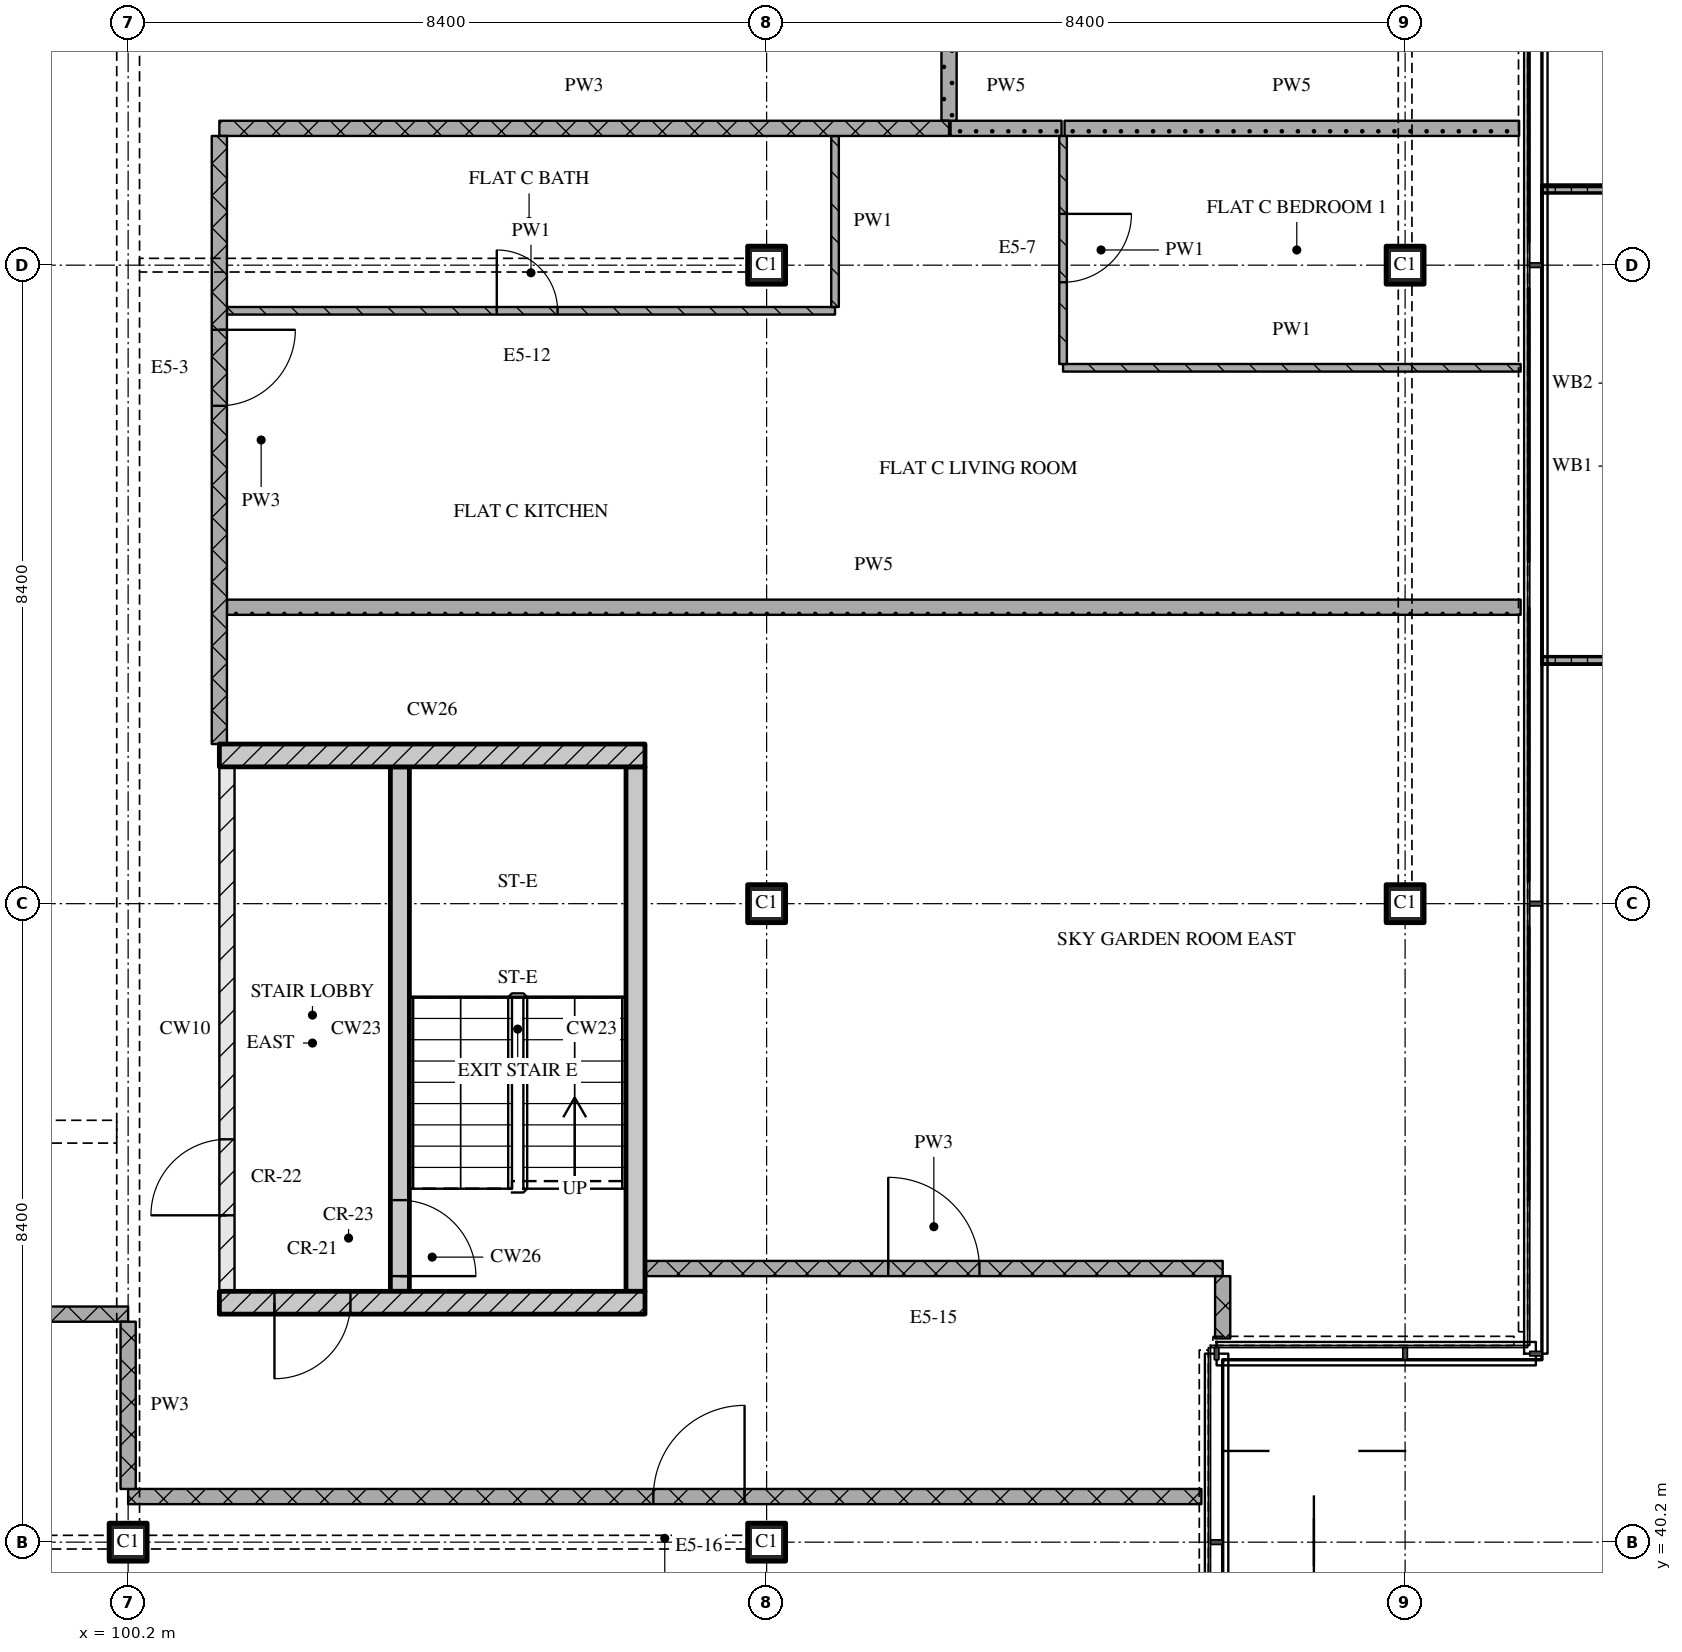
"""IFC4 building model, lengths in metres.
Left out: names, types, materials, properties, quantities, classifications, styles, units other than length and angle.
Written with IfcOpenShell. Run it as: python <this file> out.ifc"""

import sys

from ifc_helpers import new_model, si_unit, direction, frame, frame_2d, origin, origin_2d, place, context, subcontext, project, spatial, polyline, rectangle, outline, extrude, element, fill, save


model = new_model("IFC4")
c1 = context("Model", 3, precision=1e-05, world=origin(), true_north=direction((0.0, 1.0)))
c2 = subcontext(c1, "Body", "Model", "MODEL_VIEW")
j1 = project(units=[si_unit("LENGTHUNIT", "METRE"), si_unit("PLANEANGLEUNIT", "RADIAN")], contexts=[c1])
p1 = place(None, origin())
s1 = spatial("IfcSite", under=j1, at=p1, CompositionType="ELEMENT")
p2 = place(p1, origin())
s2 = spatial("IfcBuilding", under=s1, at=p2, CompositionType="ELEMENT")
p3 = place(p2, frame((0.0, 0.0, 288.75)))
s3 = spatial("IfcBuildingStorey", under=s2, at=p3, CompositionType="ELEMENT", Elevation=288.75)
for number, where, z_axis, x_axis in (
    (1, (100.2, 40.2, 0.0), (0.0, 0.0, 1.0), (1.0, 0.0, 0.0)),
    (2, (108.6, 40.2, 0.0), (0.0, 0.0, 1.0), (1.0, 0.0, 0.0)),
    (3, (108.6, 48.6, 0.0), (0.0, 0.0, 1.0), (1.0, 0.0, 0.0)),
    (4, (108.6, 57.0, 0.0), (0.0, 0.0, 1.0), (1.0, 0.0, 0.0)),
    (5, (117.0, 48.6, 0.0), (0.0, 0.0, 1.0), (1.0, 0.0, 0.0)),
    (6, (117.0, 57.0, 0.0), (0.0, 0.0, 1.0), (1.0, 0.0, 0.0)),
):
    element("IfcColumn", number, at=place(p3, frame(where, z_axis=z_axis, x_axis=x_axis)), inside=s3, PredefinedType="COLUMN", context=c2, shape_type="SweptSolid", body=[
        extrude(rectangle(XDim=0.5, YDim=0.5, at=origin_2d()), origin(), (0.0, 0.0, 1.0), 3.6),
    ])
p4 = place(p3, origin())
e7 = element("IfcWall", 7, at=p4, inside=s3, PredefinedType="SOLIDWALL", context=c2, shape_type="SweptSolid", body=[
    extrude(outline(polyline([(118.8, 51.75), (118.8, 51.85), (120.567, 51.85), (120.567, 57.95), (118.8, 57.95), (118.8, 58.05), (120.667, 58.05), (120.667, 51.75), (118.8, 51.75)])), origin(), (0.0, 0.0, 1.0), 1.0),
])
p5 = place(p3, frame((101.4, 43.35, 0.0), z_axis=(0.0, 0.0, 1.0), x_axis=(1.0, 0.0, 0.0)))
e8 = element("IfcWall", 8, at=p5, inside=s3, PredefinedType="SOLIDWALL", context=c2, shape_type="SweptSolid", body=[
    extrude(rectangle(XDim=5.6, YDim=0.3, at=frame_2d((2.8, 0.0))), origin(), (0.0, 0.0, 1.0), 3.32),
])
p6 = place(p5, frame((0.725, 0.0, 0.0)))
e9 = element("IfcOpeningElement", 9, at=p6, cuts=e8, PredefinedType="OPENING", context=c2, shape_type="SweptSolid", body=[
    extrude(rectangle(XDim=1.0, YDim=2.1, at=frame_2d((0.5, 1.05))), frame((0.0, 0.16, 0.0), z_axis=(0.0, -1.0, 0.0), x_axis=(1.0, 0.0, 0.0)), (0.0, 0.0, 1.0), 0.32),
])
p7 = place(p3, frame((101.5, 43.5, 0.0), z_axis=(0.0, 0.0, 1.0), x_axis=(0.0, 1.0, 0.0)))
e10 = element("IfcWall", 10, at=p7, inside=s3, PredefinedType="PARTITIONING", context=c2, shape_type="SweptSolid", body=[
    extrude(rectangle(XDim=6.9, YDim=0.2, at=frame_2d((3.45, 0.0))), origin(), (0.0, 0.0, 1.0), 3.32),
])
p8 = place(p7, frame((1.0, 0.0, 0.0)))
e11 = element("IfcOpeningElement", 11, at=p8, cuts=e10, PredefinedType="OPENING", context=c2, shape_type="SweptSolid", body=[
    extrude(rectangle(XDim=1.0, YDim=2.1, at=frame_2d((0.5, 1.05))), frame((0.0, 0.11, 0.0), z_axis=(0.0, -1.0, 0.0), x_axis=(1.0, 0.0, 0.0)), (0.0, 0.0, 1.0), 0.22),
])
p9 = place(p3, frame((103.775, 43.5, 0.0), z_axis=(0.0, 0.0, 1.0), x_axis=(0.0, 1.0, 0.0)))
e12 = element("IfcWall", 12, at=p9, inside=s3, PredefinedType="SOLIDWALL", context=c2, shape_type="SweptSolid", body=[
    extrude(rectangle(XDim=6.9, YDim=0.25, at=frame_2d((3.45, 0.0))), origin(), (0.0, 0.0, 1.0), 3.32),
])
p10 = place(p9, frame((0.2, 0.0, 0.0)))
e13 = element("IfcOpeningElement", 13, at=p10, cuts=e12, PredefinedType="OPENING", context=c2, shape_type="SweptSolid", body=[
    extrude(rectangle(XDim=1.0, YDim=2.1, at=frame_2d((0.5, 1.05))), frame((0.0, 0.135, 0.0), z_axis=(0.0, -1.0, 0.0), x_axis=(1.0, 0.0, 0.0)), (0.0, 0.0, 1.0), 0.27),
])
p11 = place(p3, frame((106.875, 43.5, 0.0), z_axis=(0.0, 0.0, 1.0), x_axis=(0.0, 1.0, 0.0)))
e14 = element("IfcWall", 14, at=p11, inside=s3, PredefinedType="SOLIDWALL", context=c2, shape_type="SweptSolid", body=[
    extrude(rectangle(XDim=6.9, YDim=0.25, at=frame_2d((3.45, 0.0))), origin(), (0.0, 0.0, 1.0), 3.32),
])
p12 = place(p3, frame((101.4, 50.55, 0.0), z_axis=(0.0, 0.0, 1.0), x_axis=(1.0, 0.0, 0.0)))
e15 = element("IfcWall", 15, at=p12, inside=s3, PredefinedType="SOLIDWALL", context=c2, shape_type="SweptSolid", body=[
    extrude(rectangle(XDim=5.6, YDim=0.3, at=frame_2d((2.8, 0.0))), origin(), (0.0, 0.0, 1.0), 3.32),
])
p13 = place(p3, frame((114.32, 40.8, 0.0), z_axis=(0.0, 0.0, 1.0), x_axis=(-1.0, 0.0, 0.0)))
e16 = element("IfcWall", 16, at=p13, inside=s3, PredefinedType="PARTITIONING", context=c2, shape_type="SweptSolid", body=[
    extrude(rectangle(XDim=14.12, YDim=0.2, at=frame_2d((7.06, 0.0))), origin(), (0.0, 0.0, 1.0), 3.32),
])
p14 = place(p13, frame((6.01, 0.0, 0.0)))
e17 = element("IfcOpeningElement", 17, at=p14, cuts=e16, PredefinedType="OPENING", context=c2, shape_type="SweptSolid", body=[
    extrude(rectangle(XDim=1.2, YDim=2.1, at=frame_2d((0.6, 1.05))), frame((0.0, 0.11, 0.0), z_axis=(0.0, -1.0, 0.0), x_axis=(1.0, 0.0, 0.0)), (0.0, 0.0, 1.0), 0.22),
])
p15 = place(p3, frame((100.2, 43.2, 0.0), z_axis=(0.0, 0.0, 1.0), x_axis=(-1.0, 0.0, 0.0)))
e18 = element("IfcWall", 18, at=p15, inside=s3, PredefinedType="PARTITIONING", context=c2, shape_type="SweptSolid", body=[
    extrude(rectangle(XDim=25.2, YDim=0.2, at=frame_2d((12.6, 0.0))), origin(), (0.0, 0.0, 1.0), 3.32),
])
p16 = place(p15, frame((12.0, 0.0, 0.0)))
e19 = element("IfcOpeningElement", 19, at=p16, cuts=e18, PredefinedType="OPENING", context=c2, shape_type="SweptSolid", body=[
    extrude(rectangle(XDim=1.2, YDim=2.1, at=frame_2d((0.6, 1.05))), frame((0.0, 0.11, 0.0), z_axis=(0.0, -1.0, 0.0), x_axis=(1.0, 0.0, 0.0)), (0.0, 0.0, 1.0), 0.22),
])
p17 = place(p3, frame((107.0, 43.8, 0.0), z_axis=(0.0, 0.0, 1.0), x_axis=(1.0, 0.0, 0.0)))
e20 = element("IfcWall", 20, at=p17, inside=s3, PredefinedType="PARTITIONING", context=c2, shape_type="SweptSolid", body=[
    extrude(rectangle(XDim=7.6, YDim=0.2, at=frame_2d((3.8, 0.0))), origin(), (0.0, 0.0, 1.0), 3.32),
])
p18 = place(p17, frame((3.2, 0.0, 0.0)))
e21 = element("IfcOpeningElement", 21, at=p18, cuts=e20, PredefinedType="OPENING", context=c2, shape_type="SweptSolid", body=[
    extrude(rectangle(XDim=1.2, YDim=2.1, at=frame_2d((0.6, 1.05))), frame((0.0, 0.11, 0.0), z_axis=(0.0, -1.0, 0.0), x_axis=(1.0, 0.0, 0.0)), (0.0, 0.0, 1.0), 0.22),
])
p19 = place(p3, frame((101.5, 52.5, 0.0), z_axis=(0.0, 0.0, 1.0), x_axis=(1.0, 0.0, 0.0)))
e22 = element("IfcWall", 22, at=p19, inside=s3, PredefinedType="PARTITIONING", context=c2, shape_type="SweptSolid", body=[
    extrude(rectangle(XDim=17.02, YDim=0.2, at=frame_2d((8.51, 0.0))), origin(), (0.0, 0.0, 1.0), 3.32),
])
p20 = place(p3, frame((112.5, 55.65, 0.0), z_axis=(0.0, 0.0, 1.0), x_axis=(1.0, 0.0, 0.0)))
e23 = element("IfcWall", 23, at=p20, inside=s3, PredefinedType="PARTITIONING", context=c2, shape_type="SweptSolid", body=[
    extrude(rectangle(XDim=6.02, YDim=0.1, at=frame_2d((3.01, 0.0))), origin(), (0.0, 0.0, 1.0), 3.32),
])
p21 = place(p3, frame((101.5, 56.4, 0.0), z_axis=(0.0, 0.0, 1.0), x_axis=(1.0, 0.0, 0.0)))
e24 = element("IfcWall", 24, at=p21, inside=s3, PredefinedType="PARTITIONING", context=c2, shape_type="SweptSolid", body=[
    extrude(rectangle(XDim=8.0, YDim=0.1, at=frame_2d((4.0, 0.0))), origin(), (0.0, 0.0, 1.0), 3.32),
])
p22 = place(p21, frame((3.55, 0.0, 0.0)))
e25 = element("IfcOpeningElement", 25, at=p22, cuts=e24, PredefinedType="OPENING", context=c2, shape_type="SweptSolid", body=[
    extrude(rectangle(XDim=0.8, YDim=2.1, at=frame_2d((0.4, 1.05))), frame((0.0, 0.06, 0.0), z_axis=(0.0, -1.0, 0.0), x_axis=(1.0, 0.0, 0.0)), (0.0, 0.0, 1.0), 0.12),
])
p23 = place(p3, frame((101.4, 58.8, 0.0), z_axis=(0.0, 0.0, 1.0), x_axis=(1.0, 0.0, 0.0)))
e26 = element("IfcWall", 26, at=p23, inside=s3, PredefinedType="PARTITIONING", context=c2, shape_type="SweptSolid", body=[
    extrude(rectangle(XDim=9.6, YDim=0.2, at=frame_2d((4.8, 0.0))), origin(), (0.0, 0.0, 1.0), 3.32),
])
p24 = place(p3, frame((111.02, 58.8, 0.0), z_axis=(0.0, 0.0, 1.0), x_axis=(1.0, 0.0, 0.0)))
e27 = element("IfcWall", 27, at=p24, inside=s3, PredefinedType="PARTITIONING", context=c2, shape_type="SweptSolid", body=[
    extrude(rectangle(XDim=1.46, YDim=0.2, at=frame_2d((0.73, 0.0))), origin(), (0.0, 0.0, 1.0), 3.32),
])
p25 = place(p3, frame((112.52, 58.8, 0.0), z_axis=(0.0, 0.0, 1.0), x_axis=(1.0, 0.0, 0.0)))
e28 = element("IfcWall", 28, at=p25, inside=s3, PredefinedType="PARTITIONING", context=c2, shape_type="SweptSolid", body=[
    extrude(rectangle(XDim=5.98, YDim=0.2, at=frame_2d((2.99, 0.0))), origin(), (0.0, 0.0, 1.0), 3.32),
])
p26 = place(p3, frame((100.2, 43.1, 0.0), z_axis=(0.0, 0.0, 1.0), x_axis=(0.0, -1.0, 0.0)))
e29 = element("IfcWall", 29, at=p26, inside=s3, PredefinedType="PARTITIONING", context=c2, shape_type="SweptSolid", body=[
    extrude(rectangle(XDim=2.2, YDim=0.2, at=frame_2d((1.1, 0.0))), origin(), (0.0, 0.0, 1.0), 2.53),
])
p27 = place(p3, frame((101.4, 58.7, 0.0), z_axis=(0.0, 0.0, 1.0), x_axis=(0.0, -1.0, 0.0)))
e30 = element("IfcWall", 30, at=p27, inside=s3, PredefinedType="PARTITIONING", context=c2, shape_type="SweptSolid", body=[
    extrude(rectangle(XDim=8.0, YDim=0.2, at=frame_2d((4.0, 0.0))), origin(), (0.0, 0.0, 1.0), 3.32),
])
p28 = place(p27, frame((2.55, 0.0, 0.0)))
e31 = element("IfcOpeningElement", 31, at=p28, cuts=e30, PredefinedType="OPENING", context=c2, shape_type="SweptSolid", body=[
    extrude(rectangle(XDim=1.0, YDim=2.1, at=frame_2d((0.5, 1.05))), frame((0.0, 0.11, 0.0), z_axis=(0.0, -1.0, 0.0), x_axis=(1.0, 0.0, 0.0)), (0.0, 0.0, 1.0), 0.22),
])
p29 = place(p3, frame((109.5, 58.7, 0.0), z_axis=(0.0, 0.0, 1.0), x_axis=(0.0, -1.0, 0.0)))
e32 = element("IfcWall", 32, at=p29, inside=s3, PredefinedType="PARTITIONING", context=c2, shape_type="SweptSolid", body=[
    extrude(rectangle(XDim=2.25, YDim=0.1, at=frame_2d((1.125, 0.0))), origin(), (0.0, 0.0, 1.0), 3.32),
])
p30 = place(p3, frame((111.0, 61.1, 0.0), z_axis=(0.0, 0.0, 1.0), x_axis=(0.0, -1.0, 0.0)))
e33 = element("IfcWall", 33, at=p30, inside=s3, PredefinedType="PARTITIONING", context=c2, shape_type="SweptSolid", body=[
    extrude(rectangle(XDim=2.2, YDim=0.2, at=frame_2d((1.1, 0.0))), origin(), (0.0, 0.0, 1.0), 3.32),
])
p31 = place(p3, frame((112.5, 58.7, 0.0), z_axis=(0.0, 0.0, 1.0), x_axis=(0.0, -1.0, 0.0)))
e34 = element("IfcWall", 34, at=p31, inside=s3, PredefinedType="PARTITIONING", context=c2, shape_type="SweptSolid", body=[
    extrude(rectangle(XDim=3.0, YDim=0.1, at=frame_2d((1.5, 0.0))), origin(), (0.0, 0.0, 1.0), 3.32),
])
p32 = place(p31, frame((1.025, 0.0, 0.0)))
e35 = element("IfcOpeningElement", 35, at=p32, cuts=e34, PredefinedType="OPENING", context=c2, shape_type="SweptSolid", body=[
    extrude(rectangle(XDim=0.9, YDim=2.1, at=frame_2d((0.45, 1.05))), frame((0.0, 0.06, 0.0), z_axis=(0.0, -1.0, 0.0), x_axis=(1.0, 0.0, 0.0)), (0.0, 0.0, 1.0), 0.12),
])
p33 = place(p3, frame((114.6, 43.7, 0.0), z_axis=(0.0, 0.0, 1.0), x_axis=(0.0, -1.0, 0.0)))
e36 = element("IfcWall", 36, at=p33, inside=s3, PredefinedType="PARTITIONING", context=c2, shape_type="SweptSolid", body=[
    extrude(rectangle(XDim=0.82, YDim=0.2, at=frame_2d((0.41, 0.0))), origin(), (0.0, 0.0, 1.0), 3.32),
])
p34 = place(p6, origin())
e37 = element("IfcDoor", 37, at=p34, inside=s3, OperationType="SINGLE_SWING_RIGHT", PredefinedType="DOOR", context=c2, shape_type="SweptSolid", body=[
    extrude(rectangle(XDim=1.0, YDim=2.1, at=frame_2d((0.5, 1.05))), frame((0.0, 0.025, 0.0), z_axis=(0.0, -1.0, 0.0), x_axis=(1.0, 0.0, 0.0)), (0.0, 0.0, 1.0), 0.05),
])
fill(e9, e37)
p35 = place(p10, origin())
e38 = element("IfcDoor", 38, at=p35, inside=s3, OperationType="SINGLE_SWING_RIGHT", PredefinedType="DOOR", context=c2, shape_type="SweptSolid", body=[
    extrude(rectangle(XDim=1.0, YDim=2.1, at=frame_2d((0.5, 1.05))), frame((0.0, 0.025, 0.0), z_axis=(0.0, -1.0, 0.0), x_axis=(1.0, 0.0, 0.0)), (0.0, 0.0, 1.0), 0.05),
])
fill(e13, e38)
p36 = place(p8, origin())
e39 = element("IfcDoor", 39, at=p36, inside=s3, OperationType="SINGLE_SWING_LEFT", PredefinedType="DOOR", context=c2, shape_type="SweptSolid", body=[
    extrude(rectangle(XDim=1.0, YDim=2.1, at=frame_2d((0.5, 1.05))), frame((0.0, 0.025, 0.0), z_axis=(0.0, -1.0, 0.0), x_axis=(1.0, 0.0, 0.0)), (0.0, 0.0, 1.0), 0.05),
])
fill(e11, e39)
p37 = place(p14, origin())
e40 = element("IfcDoor", 40, at=p37, inside=s3, OperationType="SINGLE_SWING_RIGHT", PredefinedType="DOOR", context=c2, shape_type="SweptSolid", body=[
    extrude(rectangle(XDim=1.2, YDim=2.1, at=frame_2d((0.6, 1.05))), frame((0.0, 0.025, 0.0), z_axis=(0.0, -1.0, 0.0), x_axis=(1.0, 0.0, 0.0)), (0.0, 0.0, 1.0), 0.05),
])
fill(e17, e40)
p38 = place(p18, origin())
e41 = element("IfcDoor", 41, at=p38, inside=s3, OperationType="SINGLE_SWING_LEFT", PredefinedType="DOOR", context=c2, shape_type="SweptSolid", body=[
    extrude(rectangle(XDim=1.2, YDim=2.1, at=frame_2d((0.6, 1.05))), frame((0.0, 0.025, 0.0), z_axis=(0.0, -1.0, 0.0), x_axis=(1.0, 0.0, 0.0)), (0.0, 0.0, 1.0), 0.05),
])
fill(e21, e41)
p39 = place(p22, origin())
e42 = element("IfcDoor", 42, at=p39, inside=s3, OperationType="SINGLE_SWING_LEFT", PredefinedType="DOOR", context=c2, shape_type="SweptSolid", body=[
    extrude(rectangle(XDim=0.8, YDim=2.1, at=frame_2d((0.4, 1.05))), frame((0.0, 0.025, 0.0), z_axis=(0.0, -1.0, 0.0), x_axis=(1.0, 0.0, 0.0)), (0.0, 0.0, 1.0), 0.05),
])
fill(e25, e42)
p40 = place(p28, origin())
e43 = element("IfcDoor", 43, at=p40, inside=s3, OperationType="SINGLE_SWING_LEFT", PredefinedType="DOOR", context=c2, shape_type="SweptSolid", body=[
    extrude(rectangle(XDim=1.0, YDim=2.1, at=frame_2d((0.5, 1.05))), frame((0.0, 0.025, 0.0), z_axis=(0.0, -1.0, 0.0), x_axis=(1.0, 0.0, 0.0)), (0.0, 0.0, 1.0), 0.05),
])
fill(e31, e43)
p41 = place(p32, origin())
e44 = element("IfcDoor", 44, at=p41, inside=s3, OperationType="SINGLE_SWING_LEFT", PredefinedType="DOOR", context=c2, shape_type="SweptSolid", body=[
    extrude(rectangle(XDim=0.9, YDim=2.1, at=frame_2d((0.45, 1.05))), frame((0.0, 0.025, 0.0), z_axis=(0.0, -1.0, 0.0), x_axis=(1.0, 0.0, 0.0)), (0.0, 0.0, 1.0), 0.05),
])
fill(e35, e44)
save(model, sys.argv[1])
